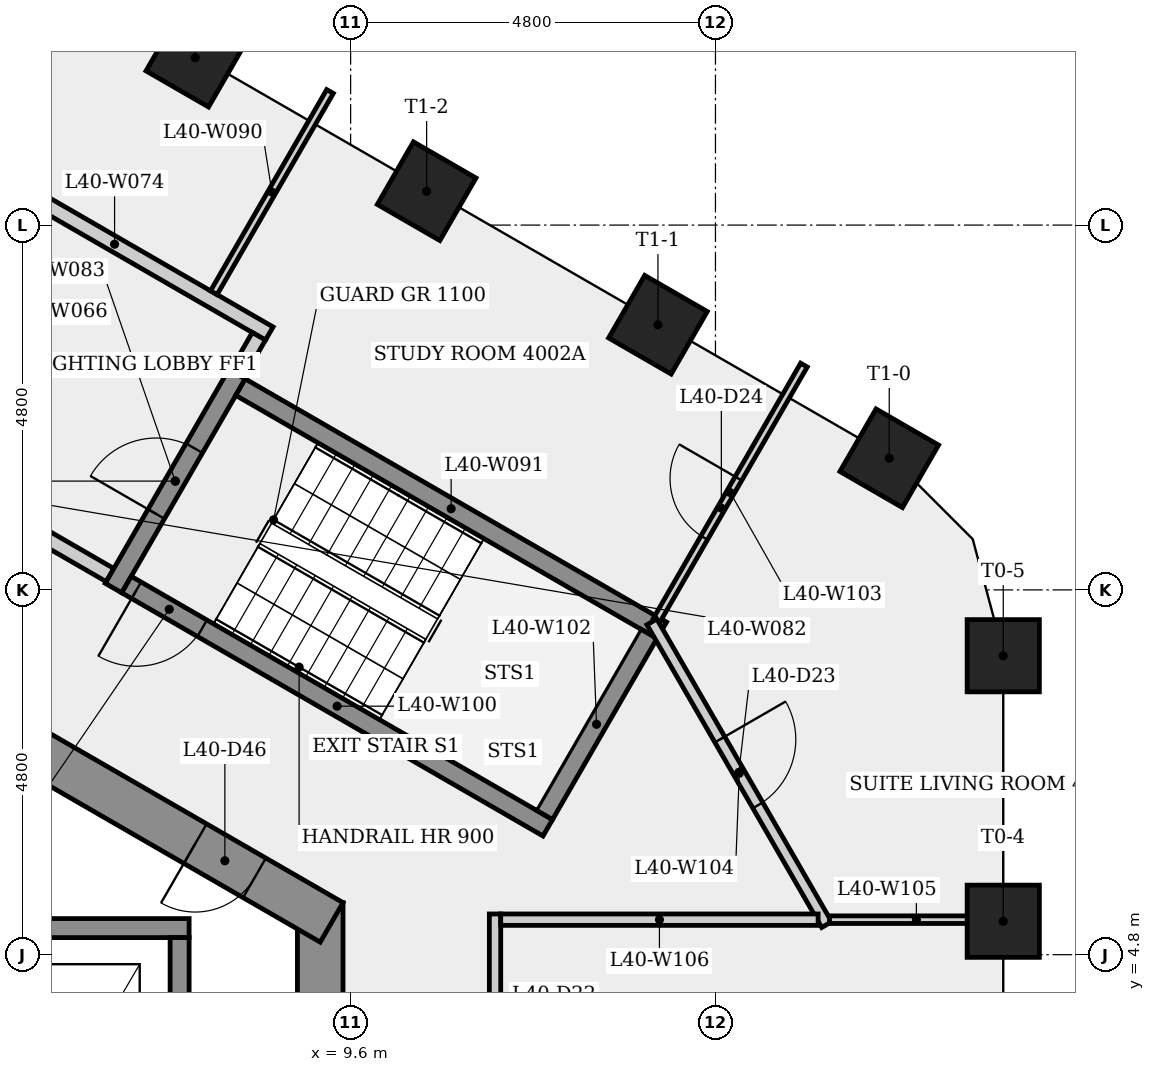
"""IFC4 building model, lengths in metres.
Left out: names, types, materials, properties, quantities, classifications, styles, units other than length and angle.
Written with IfcOpenShell. Run it as: python <this file> out.ifc"""

import sys

from ifc_helpers import new_model, si_unit, direction, frame, frame_2d, origin, origin_2d, place, context, subcontext, project, spatial, rectangle, extrude, element, fill, save


model = new_model("IFC4")
c1 = context("Model", 3, precision=1e-05, world=origin(), true_north=direction((0.0, 1.0)))
c2 = subcontext(c1, "Body", "Model", "MODEL_VIEW")
j1 = project(units=[si_unit("LENGTHUNIT", "METRE"), si_unit("PLANEANGLEUNIT", "RADIAN")], contexts=[c1])
p1 = place(None, origin())
s1 = spatial("IfcSite", under=j1, at=p1, CompositionType="ELEMENT")
p2 = place(p1, origin())
s2 = spatial("IfcBuilding", under=s1, at=p2, CompositionType="ELEMENT")
p3 = place(p2, frame((0.0, 0.0, 152.7)))
s3 = spatial("IfcBuildingStorey", under=s2, at=p3, CompositionType="ELEMENT", Elevation=152.7)
p4 = place(p3, frame((9.2, -5.485, 0.0), z_axis=(0.0, 0.0, 1.0), x_axis=(0.0, 1.0, 0.0)))
e1 = element("IfcWall", 1, at=p4, inside=s3, PredefinedType="SHEAR", context=c2, shape_type="SweptSolid", body=[
    extrude(rectangle(XDim=10.97, YDim=0.6, at=frame_2d((5.485, 0.0))), origin(), (0.0, 0.0, 1.0), 3.4),
])
p5 = place(p4, frame((4.685, 0.0, 0.0)))
e2 = element("IfcOpeningElement", 2, at=p5, cuts=e1, PredefinedType="OPENING", context=c2, shape_type="SweptSolid", body=[
    extrude(rectangle(XDim=1.6, YDim=2.1, at=frame_2d((0.8, 1.05))), frame((0.0, 0.31, 0.0), z_axis=(0.0, -1.0, 0.0), x_axis=(1.0, 0.0, 0.0)), (0.0, 0.0, 1.0), 0.62),
])
p6 = place(p3, frame((9.35, 5.225, 0.0), z_axis=(0.0, 0.0, 1.0), x_axis=(-0.866023993627, 0.500002442456, 0.0)))
e3 = element("IfcWall", 3, at=p6, inside=s3, PredefinedType="SHEAR", context=c2, shape_type="SweptSolid", body=[
    extrude(rectangle(XDim=10.97, YDim=0.6, at=frame_2d((5.485, 0.0))), origin(), (0.0, 0.0, 1.0), 3.4),
])
p7 = place(p6, frame((7.518, 0.0, 0.0)))
e4 = element("IfcOpeningElement", 4, at=p7, cuts=e3, PredefinedType="OPENING", context=c2, shape_type="SweptSolid", body=[
    extrude(rectangle(XDim=0.9, YDim=2.1, at=frame_2d((0.45, 1.05))), frame((0.0, 0.31, 0.0), z_axis=(0.0, -1.0, 0.0), x_axis=(1.0, 0.0, 0.0)), (0.0, 0.0, 1.0), 0.62),
])
p8 = place(p6, frame((1.172, 0.0, 0.0)))
e5 = element("IfcOpeningElement", 5, at=p8, cuts=e3, PredefinedType="OPENING", context=c2, shape_type="SweptSolid", body=[
    extrude(rectangle(XDim=0.9, YDim=2.1, at=frame_2d((0.45, 1.05))), frame((0.0, 0.31, 0.0), z_axis=(0.0, -1.0, 0.0), x_axis=(1.0, 0.0, 0.0)), (0.0, 0.0, 1.0), 0.62),
])
for number, where, z_axis, x_axis in (
    (6, (18.187, 5.24, 0.0), (0.0, 0.0, 1.0), (1.0, 0.0, 0.0)),
    (7, (18.187, 8.734, 0.0), (0.0, 0.0, 1.0), (1.0, 0.0, 0.0)),
    (8, (16.687, 11.332, 0.0), (0.0, 0.0, 1.0), (0.5, 0.866, 0.0)),
    (9, (13.643, 13.089, 0.0), (0.0, 0.0, 1.0), (0.5, 0.866, 0.0)),
    (10, (10.6, 14.846, 0.0), (0.0, 0.0, 1.0), (0.5, 0.866, 0.0)),
    (11, (7.557, 16.603, 0.0), (0.0, 0.0, 1.0), (0.5, 0.866, 0.0)),
):
    element("IfcColumn", number, at=place(p3, frame(where, z_axis=z_axis, x_axis=x_axis)), inside=s3, PredefinedType="COLUMN", context=c2, shape_type="SweptSolid", body=[
        extrude(rectangle(XDim=0.95, YDim=0.95, at=origin_2d()), origin(), (0.0, 0.0, 1.0), 3.4),
    ])
p9 = place(p3, frame((-7.225, 5.15, 0.0), z_axis=(0.0, 0.0, 1.0), x_axis=(1.0, 0.0, 0.0)))
e12 = element("IfcWall", 12, at=p9, inside=s3, PredefinedType="SHEAR", context=c2, shape_type="SweptSolid", body=[
    extrude(rectangle(XDim=14.7, YDim=0.25, at=frame_2d((7.35, 0.0))), origin(), (0.0, 0.0, 1.0), 3.05),
])
p10 = place(p3, frame((4.459, 15.323, 0.0), z_axis=(0.0, 0.0, 1.0), x_axis=(0.866016039709, -0.500016218704, 0.0)))
e13 = element("IfcWall", 13, at=p10, inside=s3, PredefinedType="PARTITIONING", context=c2, shape_type="SweptSolid", body=[
    extrude(rectangle(XDim=4.7, YDim=0.2, at=frame_2d((2.35, 0.0))), origin(), (0.0, 0.0, 1.0), 3.05),
])
p11 = place(p3, frame((6.435, 9.795, 0.0), z_axis=(0.0, 0.0, 1.0), x_axis=(-0.866012907634, 0.500021643343, 0.0)))
e14 = element("IfcWall", 14, at=p11, inside=s3, PredefinedType="PARTITIONING", context=c2, shape_type="SweptSolid", body=[
    extrude(rectangle(XDim=4.45, YDim=0.2, at=frame_2d((2.225, 0.0))), origin(), (0.0, 0.0, 1.0), 3.05),
])
p12 = place(p11, frame((1.675, 0.0, 0.0)))
e15 = element("IfcOpeningElement", 15, at=p12, cuts=e14, PredefinedType="OPENING", context=c2, shape_type="SweptSolid", body=[
    extrude(rectangle(XDim=1.1, YDim=2.1, at=frame_2d((0.55, 1.05))), frame((0.0, 0.11, 0.0), z_axis=(0.0, -1.0, 0.0), x_axis=(1.0, 0.0, 0.0)), (0.0, 0.0, 1.0), 0.22),
])
p13 = place(p3, frame((6.48, 9.624, 0.0), z_axis=(0.0, 0.0, 1.0), x_axis=(0.500017246033, 0.866015446554, 0.0)))
e16 = element("IfcWall", 16, at=p13, inside=s3, PredefinedType="SHEAR", context=c2, shape_type="SweptSolid", body=[
    extrude(rectangle(XDim=3.25, YDim=0.25, at=frame_2d((1.625, 0.0))), origin(), (0.0, 0.0, 1.0), 3.05),
])
p14 = place(p13, frame((1.125, 0.0, 0.0)))
e17 = element("IfcOpeningElement", 17, at=p14, cuts=e16, PredefinedType="OPENING", context=c2, shape_type="SweptSolid", body=[
    extrude(rectangle(XDim=1.0, YDim=2.1, at=frame_2d((0.5, 1.05))), frame((0.0, 0.135, 0.0), z_axis=(0.0, -1.0, 0.0), x_axis=(1.0, 0.0, 0.0)), (0.0, 0.0, 1.0), 0.27),
])
p15 = place(p3, frame((7.35, 5.025, 0.0), z_axis=(0.0, 0.0, 1.0), x_axis=(0.0, -1.0, 0.0)))
e18 = element("IfcWall", 18, at=p15, inside=s3, PredefinedType="SHEAR", context=c2, shape_type="SweptSolid", body=[
    extrude(rectangle(XDim=3.1, YDim=0.25, at=frame_2d((1.55, 0.0))), origin(), (0.0, 0.0, 1.0), 3.4),
])
p16 = place(p3, frame((7.8, 13.51, 0.0), z_axis=(0.0, 0.0, 1.0), x_axis=(0.500003532061, 0.866023364538, 0.0)))
e19 = element("IfcWall", 19, at=p16, inside=s3, PredefinedType="PARTITIONING", context=c2, shape_type="SweptSolid", body=[
    extrude(rectangle(XDim=3.058, YDim=0.1, at=frame_2d((1.529, 0.0))), origin(), (0.0, 0.0, 1.0), 3.05),
])
p17 = place(p3, frame((8.151, 12.268, 0.0), z_axis=(0.0, 0.0, 1.0), x_axis=(0.866025499775, -0.499999833739, 0.0)))
e20 = element("IfcWall", 20, at=p17, inside=s3, PredefinedType="SHEAR", context=c2, shape_type="SweptSolid", body=[
    extrude(rectangle(XDim=6.4, YDim=0.25, at=frame_2d((3.2, 0.0))), origin(), (0.0, 0.0, 1.0), 3.05),
])
p18 = place(p3, frame((8.393, 12.937, 0.0), z_axis=(0.0, 0.0, 1.0), x_axis=(-0.500065409566, -0.86598763626, 0.0)))
e21 = element("IfcWall", 21, at=p18, inside=s3, PredefinedType="PARTITIONING", context=c2, shape_type="SweptSolid", body=[
    extrude(rectangle(XDim=0.575, YDim=0.2, at=frame_2d((0.288, 0.0))), origin(), (0.0, 0.0, 1.0), 3.05),
])
p19 = place(p3, frame((11.5, -5.186, 0.0), z_axis=(0.0, 0.0, 1.0), x_axis=(0.0, 1.0, 0.0)))
e22 = element("IfcWall", 22, at=p19, inside=s3, PredefinedType="PARTITIONING", context=c2, shape_type="SweptSolid", body=[
    extrude(rectangle(XDim=10.521, YDim=0.15, at=frame_2d((5.261, 0.0))), origin(), (0.0, 0.0, 1.0), 3.05),
])
p20 = place(p19, frame((2.499, 0.0, 0.0)))
e23 = element("IfcOpeningElement", 23, at=p20, cuts=e22, PredefinedType="OPENING", context=c2, shape_type="SweptSolid", body=[
    extrude(rectangle(XDim=1.0, YDim=2.1, at=frame_2d((0.5, 1.05))), frame((0.0, 0.085, 0.0), z_axis=(0.0, -1.0, 0.0), x_axis=(1.0, 0.0, 0.0)), (0.0, 0.0, 1.0), 0.17),
])
p21 = place(p19, frame((8.178, 0.0, 0.0)))
e24 = element("IfcOpeningElement", 24, at=p21, cuts=e22, PredefinedType="OPENING", context=c2, shape_type="SweptSolid", body=[
    extrude(rectangle(XDim=1.0, YDim=2.1, at=frame_2d((0.5, 1.05))), frame((0.0, 0.085, 0.0), z_axis=(0.0, -1.0, 0.0), x_axis=(1.0, 0.0, 0.0)), (0.0, 0.0, 1.0), 0.17),
])
p22 = place(p3, frame((12.194, 6.47, 0.0), z_axis=(0.0, 0.0, 1.0), x_axis=(-0.866025499775, 0.499999833739, 0.0)))
e25 = element("IfcWall", 25, at=p22, inside=s3, PredefinedType="SHEAR", context=c2, shape_type="SweptSolid", body=[
    extrude(rectangle(XDim=6.4, YDim=0.25, at=frame_2d((3.2, 0.0))), origin(), (0.0, 0.0, 1.0), 3.05),
])
p23 = place(p22, frame((5.25, 0.0, 0.0)))
e26 = element("IfcOpeningElement", 26, at=p23, cuts=e25, PredefinedType="OPENING", context=c2, shape_type="SweptSolid", body=[
    extrude(rectangle(XDim=1.0, YDim=2.1, at=frame_2d((0.5, 1.05))), frame((0.0, 0.135, 0.0), z_axis=(0.0, -1.0, 0.0), x_axis=(1.0, 0.0, 0.0)), (0.0, 0.0, 1.0), 0.27),
])
p24 = place(p3, frame((13.523, 9.022, 0.0), z_axis=(0.0, 0.0, 1.0), x_axis=(-0.500034990121, -0.866005201286, 0.0)))
e27 = element("IfcWall", 27, at=p24, inside=s3, PredefinedType="SHEAR", context=c2, shape_type="SweptSolid", body=[
    extrude(rectangle(XDim=2.75, YDim=0.25, at=frame_2d((1.375, 0.0))), origin(), (0.0, 0.0, 1.0), 3.05),
])
p25 = place(p3, frame((13.626, 9.201, 0.0), z_axis=(0.0, 0.0, 1.0), x_axis=(0.500020491252, 0.866013572832, 0.0)))
e28 = element("IfcWall", 28, at=p25, inside=s3, PredefinedType="PARTITIONING", context=c2, shape_type="SweptSolid", body=[
    extrude(rectangle(XDim=3.876, YDim=0.1, at=frame_2d((1.938, 0.0))), origin(), (0.0, 0.0, 1.0), 3.05),
])
p26 = place(p25, frame((1.253, 0.0, 0.0)))
e29 = element("IfcOpeningElement", 29, at=p26, cuts=e28, PredefinedType="OPENING", context=c2, shape_type="SweptSolid", body=[
    extrude(rectangle(XDim=0.9, YDim=2.1, at=frame_2d((0.45, 1.05))), frame((0.0, 0.06, 0.0), z_axis=(0.0, -1.0, 0.0), x_axis=(1.0, 0.0, 0.0)), (0.0, 0.0, 1.0), 0.12),
])
p27 = place(p3, frame((13.563, 9.179, 0.0), z_axis=(0.0, 0.0, 1.0), x_axis=(0.499998129301, -0.86602648383, 0.0)))
e30 = element("IfcWall", 30, at=p27, inside=s3, PredefinedType="PARTITIONING", context=c2, shape_type="SweptSolid", body=[
    extrude(rectangle(XDim=4.6, YDim=0.15, at=frame_2d((2.3, 0.0))), origin(), (0.0, 0.0, 1.0), 3.05),
])
p28 = place(p27, frame((1.787, 0.0, 0.0)))
e31 = element("IfcOpeningElement", 31, at=p28, cuts=e30, PredefinedType="OPENING", context=c2, shape_type="SweptSolid", body=[
    extrude(rectangle(XDim=1.0, YDim=2.1, at=frame_2d((0.5, 1.05))), frame((0.0, 0.085, 0.0), z_axis=(0.0, -1.0, 0.0), x_axis=(1.0, 0.0, 0.0)), (0.0, 0.0, 1.0), 0.17),
])
p29 = place(p3, frame((15.901, 5.261, 0.0), z_axis=(0.0, 0.0, 1.0), x_axis=(1.0, 0.0, 0.0)))
e32 = element("IfcWall", 32, at=p29, inside=s3, PredefinedType="PARTITIONING", context=c2, shape_type="SweptSolid", body=[
    extrude(rectangle(XDim=2.286, YDim=0.1, at=frame_2d((1.143, 0.0))), origin(), (0.0, 0.0, 1.0), 3.05),
])
p30 = place(p3, frame((15.751, 5.261, 0.0), z_axis=(0.0, 0.0, 1.0), x_axis=(-1.0, 0.0, 0.0)))
e33 = element("IfcWall", 33, at=p30, inside=s3, PredefinedType="PARTITIONING", context=c2, shape_type="SweptSolid", body=[
    extrude(rectangle(XDim=4.176, YDim=0.15, at=frame_2d((2.088, 0.0))), origin(), (0.0, 0.0, 1.0), 3.05),
])
p31 = place(p23, origin())
e34 = element("IfcDoor", 34, at=p31, inside=s3, OperationType="SINGLE_SWING_RIGHT", PredefinedType="DOOR", context=c2, shape_type="SweptSolid", body=[
    extrude(rectangle(XDim=1.0, YDim=2.1, at=frame_2d((0.5, 1.05))), frame((0.0, 0.025, 0.0), z_axis=(0.0, -1.0, 0.0), x_axis=(1.0, 0.0, 0.0)), (0.0, 0.0, 1.0), 0.05),
])
fill(e26, e34)
p32 = place(p14, origin())
e35 = element("IfcDoor", 35, at=p32, inside=s3, OperationType="SINGLE_SWING_LEFT", PredefinedType="DOOR", context=c2, shape_type="SweptSolid", body=[
    extrude(rectangle(XDim=1.0, YDim=2.1, at=frame_2d((0.5, 1.05))), frame((0.0, 0.025, 0.0), z_axis=(0.0, -1.0, 0.0), x_axis=(1.0, 0.0, 0.0)), (0.0, 0.0, 1.0), 0.05),
])
fill(e17, e35)
p33 = place(p28, origin())
e36 = element("IfcDoor", 36, at=p33, inside=s3, OperationType="SINGLE_SWING_LEFT", PredefinedType="DOOR", context=c2, shape_type="SweptSolid", body=[
    extrude(rectangle(XDim=1.0, YDim=2.1, at=frame_2d((0.5, 1.05))), frame((0.0, 0.025, 0.0), z_axis=(0.0, -1.0, 0.0), x_axis=(1.0, 0.0, 0.0)), (0.0, 0.0, 1.0), 0.05),
])
fill(e31, e36)
p34 = place(p26, origin())
e37 = element("IfcDoor", 37, at=p34, inside=s3, OperationType="SINGLE_SWING_RIGHT", PredefinedType="DOOR", context=c2, shape_type="SweptSolid", body=[
    extrude(rectangle(XDim=0.9, YDim=2.1, at=frame_2d((0.45, 1.05))), frame((0.0, 0.025, 0.0), z_axis=(0.0, -1.0, 0.0), x_axis=(1.0, 0.0, 0.0)), (0.0, 0.0, 1.0), 0.05),
])
fill(e29, e37)
p35 = place(p8, origin())
e38 = element("IfcDoor", 38, at=p35, inside=s3, OperationType="SINGLE_SWING_RIGHT", PredefinedType="DOOR", context=c2, shape_type="SweptSolid", body=[
    extrude(rectangle(XDim=0.9, YDim=2.1, at=frame_2d((0.45, 1.05))), frame((0.0, 0.025, 0.0), z_axis=(0.0, -1.0, 0.0), x_axis=(1.0, 0.0, 0.0)), (0.0, 0.0, 1.0), 0.05),
])
fill(e5, e38)
save(model, sys.argv[1])
